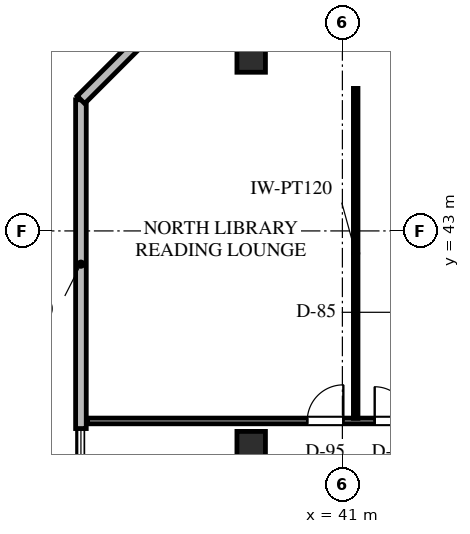
"""IFC4 building model, lengths in metres.
Left out: names, types, materials, properties, quantities, classifications, styles, units other than length and angle.
Written with IfcOpenShell. Run it as: python <this file> out.ifc"""

import sys

from ifc_helpers import new_model, si_unit, direction, frame, frame_2d, origin, origin_2d, place, context, subcontext, project, spatial, rectangle, extrude, element, fill, save


model = new_model("IFC4")
c1 = context("Model", 3, precision=1e-05, world=origin(), true_north=direction((0.0, 1.0)))
c2 = subcontext(c1, "Body", "Model", "MODEL_VIEW")
j1 = project(units=[si_unit("LENGTHUNIT", "METRE"), si_unit("PLANEANGLEUNIT", "RADIAN")], contexts=[c1])
p1 = place(None, origin())
s1 = spatial("IfcSite", under=j1, at=p1, CompositionType="ELEMENT")
p2 = place(p1, origin())
s2 = spatial("IfcBuilding", under=s1, at=p2, CompositionType="ELEMENT")
p3 = place(p2, frame((0.0, 0.0, 303.9)))
s3 = spatial("IfcBuildingStorey", under=s2, at=p3, CompositionType="ELEMENT", Elevation=303.9)
for number, where, z_axis, x_axis in (
    (1, (38.6, 37.35, 0.0), (0.0, 0.0, 1.0), (1.0, 0.0, 0.0)),
    (2, (38.6, 47.55, 0.0), (0.0, 0.0, 1.0), (1.0, 0.0, 0.0)),
):
    element("IfcColumn", number, at=place(p3, frame(where, z_axis=z_axis, x_axis=x_axis)), inside=s3, PredefinedType="COLUMN", context=c2, shape_type="SweptSolid", body=[
        extrude(rectangle(XDim=0.75, YDim=0.75, at=origin_2d()), origin(), (0.0, 0.0, 1.0), 3.6),
    ])
p4 = place(p3, frame((34.12, 37.8, 0.0), z_axis=(0.0, 0.0, 1.0), x_axis=(0.0, 1.0, 0.0)))
e3 = element("IfcWall", 3, at=p4, inside=s3, PredefinedType="STANDARD", context=c2, shape_type="SweptSolid", body=[
    extrude(rectangle(XDim=8.65, YDim=0.28, at=frame_2d((4.325, 0.0))), origin(), (0.0, 0.0, 1.0), 3.365),
])
p5 = place(p3, frame((34.12, 46.45, 0.0), z_axis=(0.0, 0.0, 1.0), x_axis=(0.707106781187, 0.707106781187, 0.0)))
e4 = element("IfcWall", 4, at=p5, inside=s3, PredefinedType="STANDARD", context=c2, shape_type="SweptSolid", body=[
    extrude(rectangle(XDim=2.729, YDim=0.28, at=frame_2d((1.365, 0.0))), origin(), (0.0, 0.0, 1.0), 3.365),
])
p6 = place(p3, frame((34.285, 38.0, 0.0), z_axis=(0.0, 0.0, 1.0), x_axis=(1.0, 0.0, 0.0)))
e5 = element("IfcWall", 5, at=p6, inside=s3, PredefinedType="PARTITIONING", context=c2, shape_type="SweptSolid", body=[
    extrude(rectangle(XDim=10.765, YDim=0.15, at=frame_2d((5.383, 0.0))), origin(), (0.0, 0.0, 1.0), 2.754),
])
p7 = place(p6, frame((5.79, 0.0, 0.0)))
e6 = element("IfcOpeningElement", 6, at=p7, cuts=e5, PredefinedType="OPENING", context=c2, shape_type="SweptSolid", body=[
    extrude(rectangle(XDim=0.95, YDim=2.15, at=frame_2d((0.475, 1.075))), frame((0.0, 0.085, 0.0), z_axis=(0.0, -1.0, 0.0), x_axis=(1.0, 0.0, 0.0)), (0.0, 0.0, 1.0), 0.17),
])
p8 = place(p6, frame((7.565, 0.0, 0.0)))
e7 = element("IfcOpeningElement", 7, at=p8, cuts=e5, PredefinedType="OPENING", context=c2, shape_type="SweptSolid", body=[
    extrude(rectangle(XDim=0.9, YDim=2.1, at=frame_2d((0.45, 1.05))), frame((0.0, 0.085, 0.0), z_axis=(0.0, -1.0, 0.0), x_axis=(1.0, 0.0, 0.0)), (0.0, 0.0, 1.0), 0.17),
])
p9 = place(p3, frame((41.35, 38.068, 0.0), z_axis=(0.0, 0.0, 1.0), x_axis=(0.0, 1.0, 0.0)))
e8 = element("IfcWall", 8, at=p9, inside=s3, PredefinedType="PARTITIONING", context=c2, shape_type="SweptSolid", body=[
    extrude(rectangle(XDim=8.682, YDim=0.12, at=frame_2d((4.341, 0.0))), origin(), (0.0, 0.0, 1.0), 3.365),
])
p10 = place(p7, origin())
e9 = element("IfcDoor", 9, at=p10, inside=s3, OperationType="SINGLE_SWING_RIGHT", PredefinedType="DOOR", context=c2, shape_type="SweptSolid", body=[
    extrude(rectangle(XDim=0.95, YDim=2.15, at=frame_2d((0.475, 1.075))), frame((0.0, 0.025, 0.0), z_axis=(0.0, -1.0, 0.0), x_axis=(1.0, 0.0, 0.0)), (0.0, 0.0, 1.0), 0.05),
])
fill(e6, e9)
p11 = place(p8, origin())
e10 = element("IfcDoor", 10, at=p11, inside=s3, OperationType="SINGLE_SWING_LEFT", PredefinedType="DOOR", context=c2, shape_type="SweptSolid", body=[
    extrude(rectangle(XDim=0.9, YDim=2.1, at=frame_2d((0.45, 1.05))), frame((0.0, 0.025, 0.0), z_axis=(0.0, -1.0, 0.0), x_axis=(1.0, 0.0, 0.0)), (0.0, 0.0, 1.0), 0.05),
])
fill(e7, e10)
save(model, sys.argv[1])
